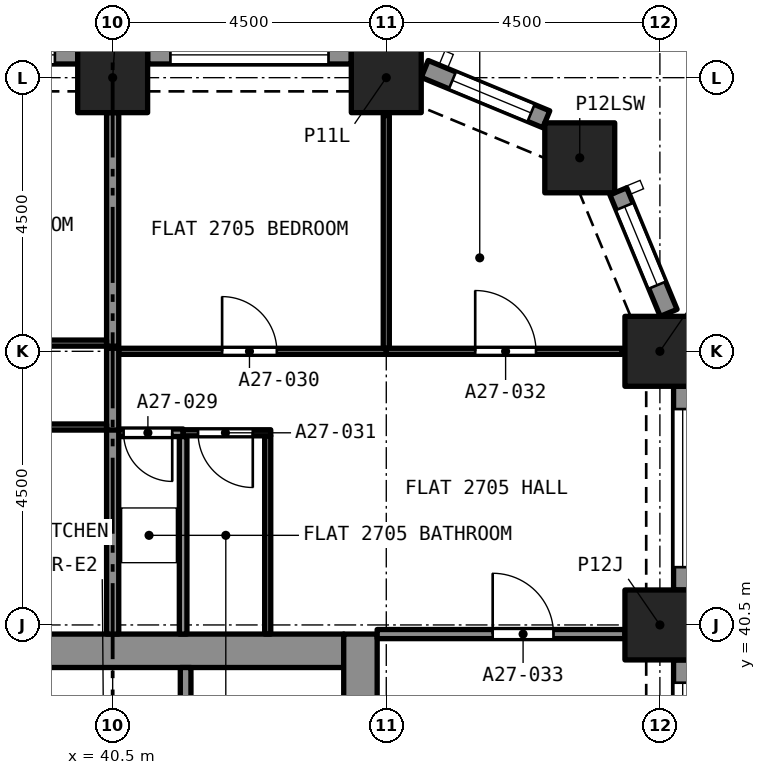
"""IFC4 building model, lengths in metres.
Left out: names, types, materials, properties, quantities, classifications, styles, units other than length and angle.
Written with IfcOpenShell. Run it as: python <this file> out.ifc"""

import sys

from ifc_helpers import new_model, si_unit, direction, frame, frame_2d, origin, origin_2d, place, context, subcontext, project, spatial, rectangle, extrude, element, fill, save


model = new_model("IFC4")
c1 = context("Model", 3, precision=1e-05, world=origin(), true_north=direction((0.0, 1.0)))
c2 = subcontext(c1, "Body", "Model", "MODEL_VIEW")
j1 = project(units=[si_unit("LENGTHUNIT", "METRE"), si_unit("PLANEANGLEUNIT", "RADIAN")], contexts=[c1])
p1 = place(None, origin())
s1 = spatial("IfcSite", under=j1, at=p1, CompositionType="ELEMENT")
p2 = place(p1, origin())
s2 = spatial("IfcBuilding", under=s1, at=p2, CompositionType="ELEMENT")
p3 = place(p2, frame((0.0, 0.0, 99.2)))
s3 = spatial("IfcBuildingStorey", under=s2, at=p3, CompositionType="ELEMENT", Elevation=99.2)
for number, where, z_axis, x_axis in (
    (1, (49.5, 40.5, 0.0), (0.0, 0.0, 1.0), (1.0, 0.0, 0.0)),
    (2, (49.5, 45.0, 0.0), (0.0, 0.0, 1.0), (1.0, 0.0, 0.0)),
    (3, (48.182, 48.182, 0.0), (0.0, 0.0, 1.0), (1.0, 0.0, 0.0)),
    (4, (40.5, 49.5, 0.0), (0.0, 0.0, 1.0), (1.0, 0.0, 0.0)),
    (5, (45.0, 49.5, 0.0), (0.0, 0.0, 1.0), (1.0, 0.0, 0.0)),
):
    element("IfcColumn", number, at=place(p3, frame(where, z_axis=z_axis, x_axis=x_axis)), inside=s3, PredefinedType="COLUMN", context=c2, shape_type="SweptSolid", body=[
        extrude(rectangle(XDim=1.15, YDim=1.15, at=origin_2d()), origin(), (0.0, 0.0, 1.0), 3.2),
    ])
p4 = place(p3, frame((36.7, 40.075, 0.0), z_axis=(0.0, 0.0, 1.0), x_axis=(1.0, 0.0, 0.0)))
e6 = element("IfcWall", 6, at=p4, inside=s3, PredefinedType="SOLIDWALL", context=c2, shape_type="SweptSolid", body=[
    extrude(rectangle(XDim=7.6, YDim=0.55, at=frame_2d((3.8, 0.0))), origin(), (0.0, 0.0, 1.0), 3.2),
])
p5 = place(p3, frame((44.575, 27.15, 0.0), z_axis=(0.0, 0.0, 1.0), x_axis=(0.0, 1.0, 0.0)))
e7 = element("IfcWall", 7, at=p5, inside=s3, PredefinedType="SOLIDWALL", context=c2, shape_type="SweptSolid", body=[
    extrude(rectangle(XDim=13.2, YDim=0.55, at=frame_2d((6.6, 0.0))), origin(), (0.0, 0.0, 1.0), 3.2),
])
p6 = place(p5, frame((8.8, 0.0, 0.0)))
e8 = element("IfcOpeningElement", 8, at=p6, cuts=e7, PredefinedType="OPENING", context=c2, shape_type="SweptSolid", body=[
    extrude(rectangle(XDim=1.2, YDim=2.1, at=frame_2d((0.6, 1.05))), frame((0.0, 0.285, 0.0), z_axis=(0.0, -1.0, 0.0), x_axis=(1.0, 0.0, 0.0)), (0.0, 0.0, 1.0), 0.57),
])
p7 = place(p3, frame((49.875, 39.925, 0.0), z_axis=(0.0, 0.0, 1.0), x_axis=(0.0, -1.0, 0.0)))
e9 = element("IfcWall", 9, at=p7, inside=s3, PredefinedType="SOLIDWALL", context=c2, shape_type="SweptSolid", body=[
    extrude(rectangle(XDim=3.35, YDim=0.3, at=frame_2d((1.675, 0.0))), origin(), (0.0, 0.0, 1.0), 3.2),
])
p8 = place(p7, frame((0.375, 0.0, 0.45)))
e10 = element("IfcOpeningElement", 10, at=p8, cuts=e9, PredefinedType="OPENING", context=c2, shape_type="SweptSolid", body=[
    extrude(rectangle(XDim=2.6, YDim=1.95, at=frame_2d((1.3, 0.975))), frame((0.0, 0.16, 0.0), z_axis=(0.0, -1.0, 0.0), x_axis=(1.0, 0.0, 0.0)), (0.0, 0.0, 1.0), 0.32),
])
p9 = place(p3, frame((49.875, 44.425, 0.0), z_axis=(0.0, 0.0, 1.0), x_axis=(0.0, -1.0, 0.0)))
e11 = element("IfcWall", 11, at=p9, inside=s3, PredefinedType="SOLIDWALL", context=c2, shape_type="SweptSolid", body=[
    extrude(rectangle(XDim=3.35, YDim=0.3, at=frame_2d((1.675, 0.0))), origin(), (0.0, 0.0, 1.0), 3.2),
])
p10 = place(p9, frame((0.375, 0.0, 0.45)))
e12 = element("IfcOpeningElement", 12, at=p10, cuts=e11, PredefinedType="OPENING", context=c2, shape_type="SweptSolid", body=[
    extrude(rectangle(XDim=2.6, YDim=1.95, at=frame_2d((1.3, 0.975))), frame((0.0, 0.16, 0.0), z_axis=(0.0, -1.0, 0.0), x_axis=(1.0, 0.0, 0.0)), (0.0, 0.0, 1.0), 0.32),
])
p11 = place(p3, frame((48.816, 47.631, 0.0), z_axis=(0.0, 0.0, 1.0), x_axis=(0.382723818695, -0.923862802911, 0.0)))
e13 = element("IfcWall", 13, at=p11, inside=s3, PredefinedType="SOLIDWALL", context=c2, shape_type="SweptSolid", body=[
    extrude(rectangle(XDim=2.164, YDim=0.3, at=frame_2d((1.082, 0.0))), origin(), (0.0, 0.0, 1.0), 3.2),
])
p12 = place(p11, frame((0.271, 0.0, 0.45)))
e14 = element("IfcOpeningElement", 14, at=p12, cuts=e13, PredefinedType="OPENING", context=c2, shape_type="SweptSolid", body=[
    extrude(rectangle(XDim=1.4, YDim=1.95, at=frame_2d((0.7, 0.975))), frame((0.0, 0.16, 0.0), z_axis=(0.0, -1.0, 0.0), x_axis=(1.0, 0.0, 0.0)), (0.0, 0.0, 1.0), 0.32),
])
p13 = place(p3, frame((45.632, 49.644, 0.0), z_axis=(0.0, 0.0, 1.0), x_axis=(0.923862802911, -0.382723818695, 0.0)))
e15 = element("IfcWall", 15, at=p13, inside=s3, PredefinedType="SOLIDWALL", context=c2, shape_type="SweptSolid", body=[
    extrude(rectangle(XDim=2.164, YDim=0.3, at=frame_2d((1.082, 0.0))), origin(), (0.0, 0.0, 1.0), 3.2),
])
p14 = place(p13, frame((0.493, 0.0, 0.45)))
e16 = element("IfcOpeningElement", 16, at=p14, cuts=e15, PredefinedType="OPENING", context=c2, shape_type="SweptSolid", body=[
    extrude(rectangle(XDim=1.4, YDim=1.95, at=frame_2d((0.7, 0.975))), frame((0.0, 0.16, 0.0), z_axis=(0.0, -1.0, 0.0), x_axis=(1.0, 0.0, 0.0)), (0.0, 0.0, 1.0), 0.32),
])
p15 = place(p3, frame((41.075, 49.875, 0.0), z_axis=(0.0, 0.0, 1.0), x_axis=(1.0, 0.0, 0.0)))
e17 = element("IfcWall", 17, at=p15, inside=s3, PredefinedType="SOLIDWALL", context=c2, shape_type="SweptSolid", body=[
    extrude(rectangle(XDim=3.35, YDim=0.3, at=frame_2d((1.675, 0.0))), origin(), (0.0, 0.0, 1.0), 3.2),
])
p16 = place(p15, frame((0.375, 0.0, 0.45)))
e18 = element("IfcOpeningElement", 18, at=p16, cuts=e17, PredefinedType="OPENING", context=c2, shape_type="SweptSolid", body=[
    extrude(rectangle(XDim=2.6, YDim=1.95, at=frame_2d((1.3, 0.975))), frame((0.0, 0.16, 0.0), z_axis=(0.0, -1.0, 0.0), x_axis=(1.0, 0.0, 0.0)), (0.0, 0.0, 1.0), 0.32),
])
p17 = place(p3, frame((36.575, 49.875, 0.0), z_axis=(0.0, 0.0, 1.0), x_axis=(1.0, 0.0, 0.0)))
e19 = element("IfcWall", 19, at=p17, inside=s3, PredefinedType="SOLIDWALL", context=c2, shape_type="SweptSolid", body=[
    extrude(rectangle(XDim=3.35, YDim=0.3, at=frame_2d((1.675, 0.0))), origin(), (0.0, 0.0, 1.0), 3.2),
])
p18 = place(p17, frame((0.375, 0.0, 0.45)))
e20 = element("IfcOpeningElement", 20, at=p18, cuts=e19, PredefinedType="OPENING", context=c2, shape_type="SweptSolid", body=[
    extrude(rectangle(XDim=2.6, YDim=1.95, at=frame_2d((1.3, 0.975))), frame((0.0, 0.16, 0.0), z_axis=(0.0, -1.0, 0.0), x_axis=(1.0, 0.0, 0.0)), (0.0, 0.0, 1.0), 0.32),
])
p19 = place(p3, frame((41.659, 43.66, 0.0), z_axis=(0.0, 0.0, 1.0), x_axis=(-1.0, 0.0, 0.0)))
e21 = element("IfcWall", 21, at=p19, inside=s3, PredefinedType="PARTITIONING", context=c2, shape_type="SweptSolid", body=[
    extrude(rectangle(XDim=1.059, YDim=0.125, at=frame_2d((0.53, 0.0))), origin(), (0.0, 0.0, 1.0), 2.9),
])
p20 = place(p19, frame((0.179, 0.0, 0.0)))
e22 = element("IfcOpeningElement", 22, at=p20, cuts=e21, PredefinedType="OPENING", context=c2, shape_type="SweptSolid", body=[
    extrude(rectangle(XDim=0.8, YDim=2.1, at=frame_2d((0.4, 1.05))), frame((0.0, 0.073, 0.0), z_axis=(0.0, -1.0, 0.0), x_axis=(1.0, 0.0, 0.0)), (0.0, 0.0, 1.0), 0.145),
])
p21 = place(p3, frame((41.659, 40.35, 0.0), z_axis=(0.0, 0.0, 1.0), x_axis=(0.0, 1.0, 0.0)))
e23 = element("IfcWall", 23, at=p21, inside=s3, PredefinedType="PARTITIONING", context=c2, shape_type="SweptSolid", body=[
    extrude(rectangle(XDim=3.247, YDim=0.125, at=frame_2d((1.624, 0.0))), origin(), (0.0, 0.0, 1.0), 2.9),
])
p22 = place(p3, frame((40.5, 40.35, 0.0), z_axis=(0.0, 0.0, 1.0), x_axis=(0.0, 1.0, 0.0)))
e24 = element("IfcWall", 24, at=p22, inside=s3, PredefinedType="PARTITIONING", context=c2, shape_type="SweptSolid", body=[
    extrude(rectangle(XDim=3.372, YDim=0.2, at=frame_2d((1.686, 0.0))), origin(), (0.0, 0.0, 1.0), 2.9),
])
p23 = place(p3, frame((40.6, 45.0, 0.0), z_axis=(0.0, 0.0, 1.0), x_axis=(1.0, 0.0, 0.0)))
e25 = element("IfcWall", 25, at=p23, inside=s3, PredefinedType="PARTITIONING", context=c2, shape_type="SweptSolid", body=[
    extrude(rectangle(XDim=4.4, YDim=0.1, at=frame_2d((2.2, 0.0))), origin(), (0.0, 0.0, 1.0), 2.9),
])
p24 = place(p23, frame((1.7, 0.0, 0.0)))
e26 = element("IfcOpeningElement", 26, at=p24, cuts=e25, PredefinedType="OPENING", context=c2, shape_type="SweptSolid", body=[
    extrude(rectangle(XDim=0.9, YDim=2.1, at=frame_2d((0.45, 1.05))), frame((0.0, 0.06, 0.0), z_axis=(0.0, -1.0, 0.0), x_axis=(1.0, 0.0, 0.0)), (0.0, 0.0, 1.0), 0.12),
])
p25 = place(p3, frame((45.0, 45.05, 0.0), z_axis=(0.0, 0.0, 1.0), x_axis=(0.0, 1.0, 0.0)))
e27 = element("IfcWall", 27, at=p25, inside=s3, PredefinedType="PARTITIONING", context=c2, shape_type="SweptSolid", body=[
    extrude(rectangle(XDim=3.828, YDim=0.1, at=frame_2d((1.914, 0.0))), origin(), (0.0, 0.0, 1.0), 2.9),
])
p26 = place(p3, frame((40.5, 45.085, 0.0), z_axis=(0.0, 0.0, 1.0), x_axis=(0.0, 1.0, 0.0)))
e28 = element("IfcWall", 28, at=p26, inside=s3, PredefinedType="PARTITIONING", context=c2, shape_type="SweptSolid", body=[
    extrude(rectangle(XDim=3.84, YDim=0.2, at=frame_2d((1.92, 0.0))), origin(), (0.0, 0.0, 1.0), 2.9),
])
p27 = place(p3, frame((43.05, 40.35, 0.0), z_axis=(0.0, 0.0, 1.0), x_axis=(0.0, 1.0, 0.0)))
e29 = element("IfcWall", 29, at=p27, inside=s3, PredefinedType="PARTITIONING", context=c2, shape_type="SweptSolid", body=[
    extrude(rectangle(XDim=3.26, YDim=0.1, at=frame_2d((1.63, 0.0))), origin(), (0.0, 0.0, 1.0), 2.9),
])
p28 = place(p3, frame((43.1, 43.66, 0.0), z_axis=(0.0, 0.0, 1.0), x_axis=(-1.0, 0.0, 0.0)))
e30 = element("IfcWall", 30, at=p28, inside=s3, PredefinedType="PARTITIONING", context=c2, shape_type="SweptSolid", body=[
    extrude(rectangle(XDim=1.441, YDim=0.1, at=frame_2d((0.72, 0.0))), origin(), (0.0, 0.0, 1.0), 2.9),
])
p29 = place(p28, frame((0.295, 0.0, 0.0)))
e31 = element("IfcOpeningElement", 31, at=p29, cuts=e30, PredefinedType="OPENING", context=c2, shape_type="SweptSolid", body=[
    extrude(rectangle(XDim=0.9, YDim=2.1, at=frame_2d((0.45, 1.05))), frame((0.0, 0.06, 0.0), z_axis=(0.0, -1.0, 0.0), x_axis=(1.0, 0.0, 0.0)), (0.0, 0.0, 1.0), 0.12),
])
p30 = place(p3, frame((45.0, 45.0, 0.0), z_axis=(0.0, 0.0, 1.0), x_axis=(1.0, 0.0, 0.0)))
e32 = element("IfcWall", 32, at=p30, inside=s3, PredefinedType="PARTITIONING", context=c2, shape_type="SweptSolid", body=[
    extrude(rectangle(XDim=3.878, YDim=0.1, at=frame_2d((1.939, 0.0))), origin(), (0.0, 0.0, 1.0), 2.9),
])
p31 = place(p30, frame((1.462, 0.0, 0.0)))
e33 = element("IfcOpeningElement", 33, at=p31, cuts=e32, PredefinedType="OPENING", context=c2, shape_type="SweptSolid", body=[
    extrude(rectangle(XDim=1.0, YDim=2.1, at=frame_2d((0.5, 1.05))), frame((0.0, 0.06, 0.0), z_axis=(0.0, -1.0, 0.0), x_axis=(1.0, 0.0, 0.0)), (0.0, 0.0, 1.0), 0.12),
])
p32 = place(p3, frame((40.5, 43.705, 0.0), z_axis=(0.0, 0.0, 1.0), x_axis=(0.0, 1.0, 0.0)))
e34 = element("IfcWall", 34, at=p32, inside=s3, PredefinedType="PARTITIONING", context=c2, shape_type="SweptSolid", body=[
    extrude(rectangle(XDim=1.345, YDim=0.2, at=frame_2d((0.672, 0.0))), origin(), (0.0, 0.0, 1.0), 2.9),
])
p33 = place(p3, frame((44.85, 40.35, 0.0), z_axis=(0.0, 0.0, 1.0), x_axis=(1.0, 0.0, 0.0)))
e35 = element("IfcWall", 35, at=p33, inside=s3, PredefinedType="PARTITIONING", context=c2, shape_type="SweptSolid", body=[
    extrude(rectangle(XDim=4.075, YDim=0.15, at=frame_2d((2.038, 0.0))), origin(), (0.0, 0.0, 1.0), 2.9),
])
p34 = place(p33, frame((1.9, 0.0, 0.0)))
e36 = element("IfcOpeningElement", 36, at=p34, cuts=e35, PredefinedType="OPENING", context=c2, shape_type="SweptSolid", body=[
    extrude(rectangle(XDim=1.0, YDim=2.1, at=frame_2d((0.5, 1.05))), frame((0.0, 0.085, 0.0), z_axis=(0.0, -1.0, 0.0), x_axis=(1.0, 0.0, 0.0)), (0.0, 0.0, 1.0), 0.17),
])
p35 = place(p3, frame((36.0, 45.135, 0.0), z_axis=(0.0, 0.0, 1.0), x_axis=(1.0, 0.0, 0.0)))
e37 = element("IfcWall", 37, at=p35, inside=s3, PredefinedType="PARTITIONING", context=c2, shape_type="SweptSolid", body=[
    extrude(rectangle(XDim=4.4, YDim=0.1, at=frame_2d((2.2, 0.0))), origin(), (0.0, 0.0, 1.0), 2.9),
])
p36 = place(p35, frame((1.8, 0.0, 0.0)))
e38 = element("IfcOpeningElement", 38, at=p36, cuts=e37, PredefinedType="OPENING", context=c2, shape_type="SweptSolid", body=[
    extrude(rectangle(XDim=0.9, YDim=2.1, at=frame_2d((0.45, 1.05))), frame((0.0, 0.06, 0.0), z_axis=(0.0, -1.0, 0.0), x_axis=(1.0, 0.0, 0.0)), (0.0, 0.0, 1.0), 0.12),
])
p37 = place(p3, frame((40.4, 43.755, 0.0), z_axis=(0.0, 0.0, 1.0), x_axis=(-1.0, 0.0, 0.0)))
e39 = element("IfcWall", 39, at=p37, inside=s3, PredefinedType="PARTITIONING", context=c2, shape_type="SweptSolid", body=[
    extrude(rectangle(XDim=3.25, YDim=0.1, at=frame_2d((1.625, 0.0))), origin(), (0.0, 0.0, 1.0), 2.9),
])
p38 = place(p37, frame((1.125, 0.0, 0.0)))
e40 = element("IfcOpeningElement", 40, at=p38, cuts=e39, PredefinedType="OPENING", context=c2, shape_type="SweptSolid", body=[
    extrude(rectangle(XDim=0.9, YDim=2.1, at=frame_2d((0.45, 1.05))), frame((0.0, 0.06, 0.0), z_axis=(0.0, -1.0, 0.0), x_axis=(1.0, 0.0, 0.0)), (0.0, 0.0, 1.0), 0.12),
])
p39 = place(p3, frame((41.7, 37.5, 0.0), z_axis=(0.0, 0.0, 1.0), x_axis=(0.0, 1.0, 0.0)))
e41 = element("IfcWall", 41, at=p39, inside=s3, PredefinedType="SOLIDWALL", context=c2, shape_type="SweptSolid", body=[
    extrude(rectangle(XDim=2.3, YDim=0.175, at=frame_2d((1.15, 0.0))), origin(), (0.0, 0.0, 1.0), 2.9),
])
p40 = place(p8, origin())
e42 = element("IfcWindow", 42, at=p40, inside=s3, PartitioningType="SINGLE_PANEL", PredefinedType="WINDOW", context=c2, shape_type="SweptSolid", body=[
    extrude(rectangle(XDim=2.6, YDim=1.95, at=frame_2d((1.3, 0.975))), frame((0.0, 0.03, 0.0), z_axis=(0.0, -1.0, 0.0), x_axis=(1.0, 0.0, 0.0)), (0.0, 0.0, 1.0), 0.06),
])
fill(e10, e42)
p41 = place(p10, origin())
e43 = element("IfcWindow", 43, at=p41, inside=s3, PartitioningType="SINGLE_PANEL", PredefinedType="WINDOW", context=c2, shape_type="SweptSolid", body=[
    extrude(rectangle(XDim=2.6, YDim=1.95, at=frame_2d((1.3, 0.975))), frame((0.0, 0.03, 0.0), z_axis=(0.0, -1.0, 0.0), x_axis=(1.0, 0.0, 0.0)), (0.0, 0.0, 1.0), 0.06),
])
fill(e12, e43)
p42 = place(p12, origin())
e44 = element("IfcWindow", 44, at=p42, inside=s3, PartitioningType="SINGLE_PANEL", PredefinedType="WINDOW", context=c2, shape_type="SweptSolid", body=[
    extrude(rectangle(XDim=1.4, YDim=1.95, at=frame_2d((0.7, 0.975))), frame((0.0, 0.03, 0.0), z_axis=(0.0, -1.0, 0.0), x_axis=(1.0, 0.0, 0.0)), (0.0, 0.0, 1.0), 0.06),
])
fill(e14, e44)
p43 = place(p14, origin())
e45 = element("IfcWindow", 45, at=p43, inside=s3, PartitioningType="SINGLE_PANEL", PredefinedType="WINDOW", context=c2, shape_type="SweptSolid", body=[
    extrude(rectangle(XDim=1.4, YDim=1.95, at=frame_2d((0.7, 0.975))), frame((0.0, 0.03, 0.0), z_axis=(0.0, -1.0, 0.0), x_axis=(1.0, 0.0, 0.0)), (0.0, 0.0, 1.0), 0.06),
])
fill(e16, e45)
p44 = place(p16, origin())
e46 = element("IfcWindow", 46, at=p44, inside=s3, PartitioningType="SINGLE_PANEL", PredefinedType="WINDOW", context=c2, shape_type="SweptSolid", body=[
    extrude(rectangle(XDim=2.6, YDim=1.95, at=frame_2d((1.3, 0.975))), frame((0.0, 0.03, 0.0), z_axis=(0.0, -1.0, 0.0), x_axis=(1.0, 0.0, 0.0)), (0.0, 0.0, 1.0), 0.06),
])
fill(e18, e46)
p45 = place(p18, origin())
e47 = element("IfcWindow", 47, at=p45, inside=s3, PartitioningType="SINGLE_PANEL", PredefinedType="WINDOW", context=c2, shape_type="SweptSolid", body=[
    extrude(rectangle(XDim=2.6, YDim=1.95, at=frame_2d((1.3, 0.975))), frame((0.0, 0.03, 0.0), z_axis=(0.0, -1.0, 0.0), x_axis=(1.0, 0.0, 0.0)), (0.0, 0.0, 1.0), 0.06),
])
fill(e20, e47)
p46 = place(p20, origin())
e48 = element("IfcDoor", 48, at=p46, inside=s3, OperationType="SINGLE_SWING_RIGHT", PredefinedType="DOOR", context=c2, shape_type="SweptSolid", body=[
    extrude(rectangle(XDim=0.8, YDim=2.1, at=frame_2d((0.4, 1.05))), frame((0.0, 0.025, 0.0), z_axis=(0.0, -1.0, 0.0), x_axis=(1.0, 0.0, 0.0)), (0.0, 0.0, 1.0), 0.05),
])
fill(e22, e48)
p47 = place(p24, origin())
e49 = element("IfcDoor", 49, at=p47, inside=s3, OperationType="SINGLE_SWING_LEFT", PredefinedType="DOOR", context=c2, shape_type="SweptSolid", body=[
    extrude(rectangle(XDim=0.9, YDim=2.1, at=frame_2d((0.45, 1.05))), frame((0.0, 0.025, 0.0), z_axis=(0.0, -1.0, 0.0), x_axis=(1.0, 0.0, 0.0)), (0.0, 0.0, 1.0), 0.05),
])
fill(e26, e49)
p48 = place(p29, origin())
e50 = element("IfcDoor", 50, at=p48, inside=s3, OperationType="SINGLE_SWING_RIGHT", PredefinedType="DOOR", context=c2, shape_type="SweptSolid", body=[
    extrude(rectangle(XDim=0.9, YDim=2.1, at=frame_2d((0.45, 1.05))), frame((0.0, 0.025, 0.0), z_axis=(0.0, -1.0, 0.0), x_axis=(1.0, 0.0, 0.0)), (0.0, 0.0, 1.0), 0.05),
])
fill(e31, e50)
p49 = place(p31, origin())
e51 = element("IfcDoor", 51, at=p49, inside=s3, OperationType="SINGLE_SWING_RIGHT", PredefinedType="DOOR", context=c2, shape_type="SweptSolid", body=[
    extrude(rectangle(XDim=1.0, YDim=2.1, at=frame_2d((0.5, 1.05))), frame((0.0, 0.025, 0.0), z_axis=(0.0, -1.0, 0.0), x_axis=(1.0, 0.0, 0.0)), (0.0, 0.0, 1.0), 0.05),
])
fill(e33, e51)
p50 = place(p34, origin())
e52 = element("IfcDoor", 52, at=p50, inside=s3, OperationType="SINGLE_SWING_RIGHT", PredefinedType="DOOR", context=c2, shape_type="SweptSolid", body=[
    extrude(rectangle(XDim=1.0, YDim=2.1, at=frame_2d((0.5, 1.05))), frame((0.0, 0.025, 0.0), z_axis=(0.0, -1.0, 0.0), x_axis=(1.0, 0.0, 0.0)), (0.0, 0.0, 1.0), 0.05),
])
fill(e36, e52)
save(model, sys.argv[1])
